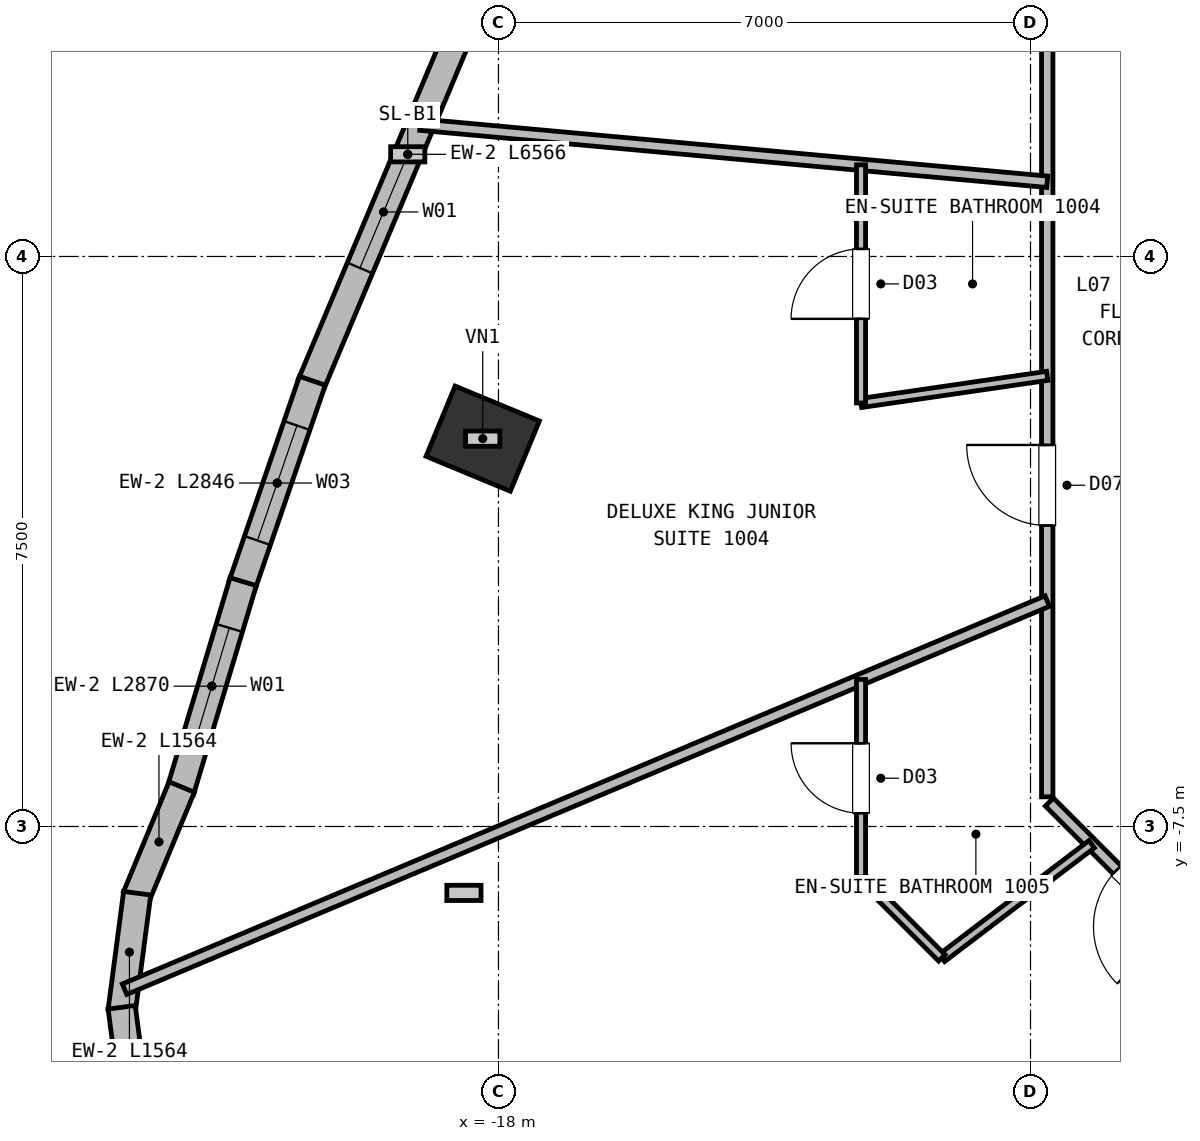
"""IFC4 building model, lengths in metres.
Left out: names, types, materials, properties, quantities, classifications, styles, units other than length and angle.
Written with IfcOpenShell. Run it as: python <this file> out.ifc"""

import sys

from ifc_helpers import new_model, si_unit, direction, frame, frame_2d, origin, origin_2d, place, context, subcontext, project, spatial, rectangle, extrude, element, fill, save


model = new_model("IFC4")
c1 = context("Model", 3, precision=1e-05, world=origin(), true_north=direction((0.0, 1.0)))
c2 = subcontext(c1, "Body", "Model", "MODEL_VIEW")
j1 = project(units=[si_unit("LENGTHUNIT", "METRE"), si_unit("PLANEANGLEUNIT", "RADIAN")], contexts=[c1])
p1 = place(None, origin())
s1 = spatial("IfcSite", under=j1, at=p1, CompositionType="ELEMENT")
p2 = place(p1, origin())
s2 = spatial("IfcBuilding", under=s1, at=p2, CompositionType="ELEMENT")
p3 = place(p2, frame((0.0, 0.0, 34.25)))
s3 = spatial("IfcBuildingStorey", under=s2, at=p3, CompositionType="ELEMENT", Elevation=34.25)
p4 = place(p3, frame((-18.207, -2.397, 0.0), z_axis=(0.0, 0.0, 1.0), x_axis=(0.382683432365, 0.923879532511, 0.0)))
e1 = element("IfcColumn", 1, at=p4, inside=s3, PredefinedType="COLUMN", context=c2, shape_type="SweptSolid", body=[
    extrude(rectangle(XDim=1.0, YDim=1.2, at=origin_2d()), origin(), (0.0, 0.0, 1.0), 3.75),
])
p5 = place(p3, frame((-20.466, -1.682, 0.0), z_axis=(0.0, 0.0, 1.0), x_axis=(0.387744465456, 0.921766906277, 0.0)))
e2 = element("IfcWall", 2, at=p5, inside=s3, PredefinedType="SOLIDWALL", context=c2, shape_type="SweptSolid", body=[
    extrude(rectangle(XDim=6.566, YDim=0.36, at=frame_2d((3.283, 0.0))), origin(), (0.0, 0.0, 1.0), 3.5),
])
p6 = place(p5, frame((1.66, 0.0, 0.72)))
e3 = element("IfcOpeningElement", 3, at=p6, cuts=e2, PredefinedType="OPENING", context=c2, shape_type="SweptSolid", body=[
    extrude(rectangle(XDim=1.6, YDim=1.88, at=frame_2d((0.8, 0.94))), frame((0.0, 0.19, 0.0), z_axis=(0.0, -1.0, 0.0), x_axis=(1.0, 0.0, 0.0)), (0.0, 0.0, 1.0), 0.38),
])
p7 = place(p3, frame((-21.374, -4.327, 0.0), z_axis=(0.0, 0.0, 1.0), x_axis=(0.325091754677, 0.945682478975, 0.0)))
e4 = element("IfcWall", 4, at=p7, inside=s3, PredefinedType="SOLIDWALL", context=c2, shape_type="SweptSolid", body=[
    extrude(rectangle(XDim=2.846, YDim=0.36, at=frame_2d((1.423, 0.0))), origin(), (0.0, 0.0, 1.0), 3.5),
])
p8 = place(p7, frame((0.623, 0.0, 0.72)))
e5 = element("IfcOpeningElement", 5, at=p8, cuts=e4, PredefinedType="OPENING", context=c2, shape_type="SweptSolid", body=[
    extrude(rectangle(XDim=1.6, YDim=1.88, at=frame_2d((0.8, 0.94))), frame((0.0, 0.19, 0.0), z_axis=(0.0, -1.0, 0.0), x_axis=(1.0, 0.0, 0.0)), (0.0, 0.0, 1.0), 0.38),
])
p9 = place(p3, frame((-22.184, -7.028, 0.0), z_axis=(0.0, 0.0, 1.0), x_axis=(0.287784902043, 0.957695071594, 0.0)))
e6 = element("IfcWall", 6, at=p9, inside=s3, PredefinedType="SOLIDWALL", context=c2, shape_type="SweptSolid", body=[
    extrude(rectangle(XDim=2.87, YDim=0.36, at=frame_2d((1.435, 0.0))), origin(), (0.0, 0.0, 1.0), 3.5),
])
p10 = place(p9, frame((0.635, 0.0, 0.72)))
e7 = element("IfcOpeningElement", 7, at=p10, cuts=e6, PredefinedType="OPENING", context=c2, shape_type="SweptSolid", body=[
    extrude(rectangle(XDim=1.6, YDim=1.88, at=frame_2d((0.8, 0.94))), frame((0.0, 0.19, 0.0), z_axis=(0.0, -1.0, 0.0), x_axis=(1.0, 0.0, 0.0)), (0.0, 0.0, 1.0), 0.38),
])
for number, where, z_axis, x_axis in (
    (8, (-22.766, -8.426, 0.0), (0.0, 0.0, 1.0), (0.383, 0.924, 0.0)),
    (9, (-22.958, -9.929, 0.0), (0.0, 0.0, 1.0), (0.131, 0.991, 0.0)),
    (10, (-22.753, -11.43, 0.0), (0.0, 0.0, 1.0), (-0.131, 0.991, 0.0)),
):
    element("IfcWall", number, at=place(p3, frame(where, z_axis=z_axis, x_axis=x_axis)), inside=s3, PredefinedType="SOLIDWALL", context=c2, shape_type="SweptSolid", body=[
        extrude(rectangle(XDim=1.564, YDim=0.36, at=frame_2d((0.782, 0.0))), origin(), (0.0, 0.0, 1.0), 3.5),
    ])
p11 = place(p3, frame((-10.78, -7.11, 0.0), z_axis=(0.0, 0.0, 1.0), x_axis=(0.0, 1.0, 0.0)))
e11 = element("IfcWall", 11, at=p11, inside=s3, PredefinedType="PARTITIONING", context=c2, shape_type="SweptSolid", body=[
    extrude(rectangle(XDim=14.22, YDim=0.15, at=frame_2d((7.11, 0.0))), origin(), (0.0, 0.0, 1.0), 3.12),
])
p12 = place(p11, frame((10.606, 0.0, 0.0)))
e12 = element("IfcOpeningElement", 12, at=p12, cuts=e11, PredefinedType="OPENING", context=c2, shape_type="SweptSolid", body=[
    extrude(rectangle(XDim=1.0, YDim=2.15, at=frame_2d((0.5, 1.075))), frame((0.0, 0.085, 0.0), z_axis=(0.0, -1.0, 0.0), x_axis=(1.0, 0.0, 0.0)), (0.0, 0.0, 1.0), 0.17),
])
p13 = place(p11, frame((3.57, 0.0, 0.0)))
e13 = element("IfcOpeningElement", 13, at=p13, cuts=e11, PredefinedType="OPENING", context=c2, shape_type="SweptSolid", body=[
    extrude(rectangle(XDim=1.06, YDim=2.15, at=frame_2d((0.53, 1.075))), frame((0.0, 0.085, 0.0), z_axis=(0.0, -1.0, 0.0), x_axis=(1.0, 0.0, 0.0)), (0.0, 0.0, 1.0), 0.17),
])
p14 = place(p3, frame((-8.578, -9.352, 0.0), z_axis=(0.0, 0.0, 1.0), x_axis=(-0.707067066127, 0.707146494016, 0.0)))
e14 = element("IfcWall", 14, at=p14, inside=s3, PredefinedType="PARTITIONING", context=c2, shape_type="SweptSolid", body=[
    extrude(rectangle(XDim=3.074, YDim=0.15, at=frame_2d((1.537, 0.0))), origin(), (0.0, 0.0, 1.0), 3.5),
])
p15 = place(p14, frame((0.754, 0.0, 0.0)))
e15 = element("IfcOpeningElement", 15, at=p15, cuts=e14, PredefinedType="OPENING", context=c2, shape_type="SweptSolid", body=[
    extrude(rectangle(XDim=1.06, YDim=2.15, at=frame_2d((0.53, 1.075))), frame((0.0, 0.085, 0.0), z_axis=(0.0, -1.0, 0.0), x_axis=(1.0, 0.0, 0.0)), (0.0, 0.0, 1.0), 0.17),
])
p16 = place(p3, frame((-10.78, 0.983, 0.0), z_axis=(0.0, 0.0, 1.0), x_axis=(-0.995868528088, 0.090806799107, 0.0)))
e16 = element("IfcWall", 16, at=p16, inside=s3, PredefinedType="PARTITIONING", context=c2, shape_type="SweptSolid", body=[
    extrude(rectangle(XDim=8.283, YDim=0.15, at=frame_2d((4.142, 0.0))), origin(), (0.0, 0.0, 1.0), 3.5),
])
p17 = place(p3, frame((-10.78, -1.571, 0.0), z_axis=(0.0, 0.0, 1.0), x_axis=(-0.989553213028, -0.144168091425, 0.0)))
e17 = element("IfcWall", 17, at=p17, inside=s3, PredefinedType="PARTITIONING", context=c2, shape_type="SweptSolid", body=[
    extrude(rectangle(XDim=2.476, YDim=0.12, at=frame_2d((1.238, 0.0))), origin(), (0.0, 0.0, 1.0), 3.5),
])
p18 = place(p3, frame((-13.23, -1.928, 0.0), z_axis=(0.0, 0.0, 1.0), x_axis=(0.0, 1.0, 0.0)))
e18 = element("IfcWall", 18, at=p18, inside=s3, PredefinedType="PARTITIONING", context=c2, shape_type="SweptSolid", body=[
    extrude(rectangle(XDim=3.134, YDim=0.12, at=frame_2d((1.567, 0.0))), origin(), (0.0, 0.0, 1.0), 3.12),
])
p19 = place(p18, frame((1.107, 0.0, 0.0)))
e19 = element("IfcOpeningElement", 19, at=p19, cuts=e18, PredefinedType="OPENING", context=c2, shape_type="SweptSolid", body=[
    extrude(rectangle(XDim=0.92, YDim=2.1, at=frame_2d((0.46, 1.05))), frame((0.0, 0.07, 0.0), z_axis=(0.0, -1.0, 0.0), x_axis=(1.0, 0.0, 0.0)), (0.0, 0.0, 1.0), 0.14),
])
p20 = place(p3, frame((-10.78, -4.535, 0.0), z_axis=(0.0, 0.0, 1.0), x_axis=(-0.921767922979, -0.387742048489, 0.0)))
e20 = element("IfcWall", 20, at=p20, inside=s3, PredefinedType="PARTITIONING", context=c2, shape_type="SweptSolid", body=[
    extrude(rectangle(XDim=13.17, YDim=0.15, at=frame_2d((6.585, 0.0))), origin(), (0.0, 0.0, 1.0), 3.5),
])
p21 = place(p3, frame((-12.166, -9.229, 0.0), z_axis=(0.0, 0.0, 1.0), x_axis=(0.796694549239, 0.604382159906, 0.0)))
e21 = element("IfcWall", 21, at=p21, inside=s3, PredefinedType="PARTITIONING", context=c2, shape_type="SweptSolid", body=[
    extrude(rectangle(XDim=2.473, YDim=0.12, at=frame_2d((1.236, 0.0))), origin(), (0.0, 0.0, 1.0), 3.5),
])
p22 = place(p3, frame((-12.166, -9.229, 0.0), z_axis=(0.0, 0.0, 1.0), x_axis=(-0.707106781187, 0.707106781187, 0.0)))
e22 = element("IfcWall", 22, at=p22, inside=s3, PredefinedType="PARTITIONING", context=c2, shape_type="SweptSolid", body=[
    extrude(rectangle(XDim=1.505, YDim=0.12, at=frame_2d((0.752, 0.0))), origin(), (0.0, 0.0, 1.0), 3.5),
])
p23 = place(p3, frame((-13.23, -8.165, 0.0), z_axis=(0.0, 0.0, 1.0), x_axis=(0.0, 1.0, 0.0)))
e23 = element("IfcWall", 23, at=p23, inside=s3, PredefinedType="PARTITIONING", context=c2, shape_type="SweptSolid", body=[
    extrude(rectangle(XDim=2.6, YDim=0.12, at=frame_2d((1.3, 0.0))), origin(), (0.0, 0.0, 1.0), 3.12),
])
p24 = place(p23, frame((0.84, 0.0, 0.0)))
e24 = element("IfcOpeningElement", 24, at=p24, cuts=e23, PredefinedType="OPENING", context=c2, shape_type="SweptSolid", body=[
    extrude(rectangle(XDim=0.92, YDim=2.1, at=frame_2d((0.46, 1.05))), frame((0.0, 0.07, 0.0), z_axis=(0.0, -1.0, 0.0), x_axis=(1.0, 0.0, 0.0)), (0.0, 0.0, 1.0), 0.14),
])
p25 = place(p3, frame((-6.802, -9.38, 0.0), z_axis=(0.0, 0.0, 1.0), x_axis=(-0.58706335667, -0.809540990472, 0.0)))
e25 = element("IfcWall", 25, at=p25, inside=s3, PredefinedType="PARTITIONING", context=c2, shape_type="SweptSolid", body=[
    extrude(rectangle(XDim=9.146, YDim=0.15, at=frame_2d((4.573, 0.0))), origin(), (0.0, 0.0, 1.0), 3.5),
])
p26 = place(p6, origin())
e26 = element("IfcWindow", 26, at=p26, inside=s3, PartitioningType="SINGLE_PANEL", PredefinedType="WINDOW", context=c2, shape_type="SweptSolid", body=[
    extrude(rectangle(XDim=1.6, YDim=1.88, at=frame_2d((0.8, 0.94))), frame((0.0, 0.03, 0.0), z_axis=(0.0, -1.0, 0.0), x_axis=(1.0, 0.0, 0.0)), (0.0, 0.0, 1.0), 0.06),
])
fill(e3, e26)
p27 = place(p8, origin())
e27 = element("IfcWindow", 27, at=p27, inside=s3, PartitioningType="SINGLE_PANEL", PredefinedType="WINDOW", context=c2, shape_type="SweptSolid", body=[
    extrude(rectangle(XDim=1.6, YDim=1.88, at=frame_2d((0.8, 0.94))), frame((0.0, 0.03, 0.0), z_axis=(0.0, -1.0, 0.0), x_axis=(1.0, 0.0, 0.0)), (0.0, 0.0, 1.0), 0.06),
])
fill(e5, e27)
p28 = place(p10, origin())
e28 = element("IfcWindow", 28, at=p28, inside=s3, PartitioningType="SINGLE_PANEL", PredefinedType="WINDOW", context=c2, shape_type="SweptSolid", body=[
    extrude(rectangle(XDim=1.6, YDim=1.88, at=frame_2d((0.8, 0.94))), frame((0.0, 0.03, 0.0), z_axis=(0.0, -1.0, 0.0), x_axis=(1.0, 0.0, 0.0)), (0.0, 0.0, 1.0), 0.06),
])
fill(e7, e28)
p29 = place(p19, origin())
e29 = element("IfcDoor", 29, at=p29, inside=s3, OperationType="SINGLE_SWING_LEFT", PredefinedType="DOOR", context=c2, shape_type="SweptSolid", body=[
    extrude(rectangle(XDim=0.92, YDim=2.1, at=frame_2d((0.46, 1.05))), frame((0.0, 0.025, 0.0), z_axis=(0.0, -1.0, 0.0), x_axis=(1.0, 0.0, 0.0)), (0.0, 0.0, 1.0), 0.05),
])
fill(e19, e29)
p30 = place(p24, origin())
e30 = element("IfcDoor", 30, at=p30, inside=s3, OperationType="SINGLE_SWING_RIGHT", PredefinedType="DOOR", context=c2, shape_type="SweptSolid", body=[
    extrude(rectangle(XDim=0.92, YDim=2.1, at=frame_2d((0.46, 1.05))), frame((0.0, 0.025, 0.0), z_axis=(0.0, -1.0, 0.0), x_axis=(1.0, 0.0, 0.0)), (0.0, 0.0, 1.0), 0.05),
])
fill(e24, e30)
p31 = place(p13, origin())
e31 = element("IfcDoor", 31, at=p31, inside=s3, OperationType="SINGLE_SWING_RIGHT", PredefinedType="DOOR", context=c2, shape_type="SweptSolid", body=[
    extrude(rectangle(XDim=1.06, YDim=2.15, at=frame_2d((0.53, 1.075))), frame((0.0, 0.025, 0.0), z_axis=(0.0, -1.0, 0.0), x_axis=(1.0, 0.0, 0.0)), (0.0, 0.0, 1.0), 0.05),
])
fill(e13, e31)
p32 = place(p15, origin())
e32 = element("IfcDoor", 32, at=p32, inside=s3, OperationType="SINGLE_SWING_LEFT", PredefinedType="DOOR", context=c2, shape_type="SweptSolid", body=[
    extrude(rectangle(XDim=1.06, YDim=2.15, at=frame_2d((0.53, 1.075))), frame((0.0, 0.025, 0.0), z_axis=(0.0, -1.0, 0.0), x_axis=(1.0, 0.0, 0.0)), (0.0, 0.0, 1.0), 0.05),
])
fill(e15, e32)
save(model, sys.argv[1])
